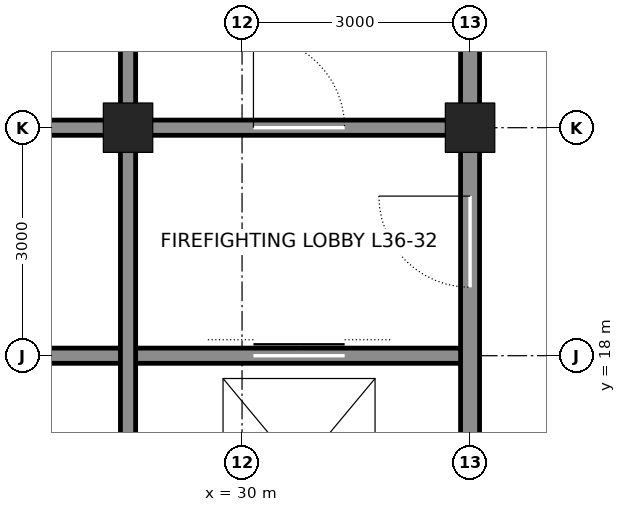
"""IFC4 building model, lengths in metres.
Left out: names, types, materials, properties, quantities, classifications, styles, units other than length and angle.
Written with IfcOpenShell. Run it as: python <this file> out.ifc"""

import sys

from ifc_helpers import new_model, si_unit, direction, frame, frame_2d, origin, origin_2d, place, context, subcontext, project, spatial, rectangle, hollow_rectangle, extrude, element, fill, save


model = new_model("IFC4")
c1 = context("Model", 3, precision=1e-05, world=origin(), true_north=direction((0.0, 1.0)))
c2 = subcontext(c1, "Body", "Model", "MODEL_VIEW")
j1 = project(units=[si_unit("LENGTHUNIT", "METRE"), si_unit("PLANEANGLEUNIT", "RADIAN")], contexts=[c1])
p1 = place(None, origin())
s1 = spatial("IfcSite", under=j1, at=p1, CompositionType="ELEMENT")
p2 = place(p1, origin())
s2 = spatial("IfcBuilding", under=s1, at=p2, CompositionType="ELEMENT")
p3 = place(p2, frame((0.0, 0.0, 165.6)))
s3 = spatial("IfcBuildingStorey", under=s2, at=p3, CompositionType="ELEMENT", Elevation=165.6)
for number, where, z_axis, x_axis in (
    (1, (33.0, 21.0, 0.0), (0.0, 0.0, 1.0), (1.0, 0.0, 0.0)),
    (2, (28.5, 21.0, 0.0), (0.0, 0.0, 1.0), (1.0, 0.0, 0.0)),
):
    element("IfcColumn", number, at=place(p3, frame(where, z_axis=z_axis, x_axis=x_axis)), inside=s3, PredefinedType="COLUMN", context=c2, shape_type="SweptSolid", body=[
        extrude(hollow_rectangle(XDim=0.65, YDim=0.65, WallThickness=0.065, at=origin_2d()), origin(), (0.0, 0.0, 1.0), 4.2),
    ])
p4 = place(p3, frame((25.5, 18.0, 0.0), z_axis=(0.0, 0.0, 1.0), x_axis=(1.0, 0.0, 0.0)))
e3 = element("IfcWall", 3, at=p4, inside=s3, PredefinedType="SOLIDWALL", context=c2, shape_type="SweptSolid", body=[
    extrude(rectangle(XDim=7.5, YDim=0.2, at=frame_2d((3.75, 0.0))), origin(), (0.0, 0.0, 1.0), 4.04),
])
p5 = place(p4, frame((4.65, 0.0, 0.0)))
e4 = element("IfcOpeningElement", 4, at=p5, cuts=e3, PredefinedType="OPENING", context=c2, shape_type="SweptSolid", body=[
    extrude(rectangle(XDim=1.2, YDim=2.1, at=frame_2d((0.6, 1.05))), frame((0.0, 0.11, 0.0), z_axis=(0.0, -1.0, 0.0), x_axis=(1.0, 0.0, 0.0)), (0.0, 0.0, 1.0), 0.22),
])
p6 = place(p3, frame((25.5, 21.0, 0.0), z_axis=(0.0, 0.0, 1.0), x_axis=(1.0, 0.0, 0.0)))
e5 = element("IfcWall", 5, at=p6, inside=s3, PredefinedType="SOLIDWALL", context=c2, shape_type="SweptSolid", body=[
    extrude(rectangle(XDim=2.75, YDim=0.2, at=frame_2d((1.375, 0.0))), origin(), (0.0, 0.0, 1.0), 3.09),
])
p7 = place(p3, frame((28.75, 21.0, 0.0), z_axis=(0.0, 0.0, 1.0), x_axis=(1.0, 0.0, 0.0)))
e6 = element("IfcWall", 6, at=p7, inside=s3, PredefinedType="SOLIDWALL", context=c2, shape_type="SweptSolid", body=[
    extrude(rectangle(XDim=4.0, YDim=0.2, at=frame_2d((2.0, 0.0))), origin(), (0.0, 0.0, 1.0), 3.09),
])
p8 = place(p7, frame((1.4, 0.0, 0.0)))
e7 = element("IfcOpeningElement", 7, at=p8, cuts=e6, PredefinedType="OPENING", context=c2, shape_type="SweptSolid", body=[
    extrude(rectangle(XDim=1.2, YDim=2.1, at=frame_2d((0.6, 1.05))), frame((0.0, 0.11, 0.0), z_axis=(0.0, -1.0, 0.0), x_axis=(1.0, 0.0, 0.0)), (0.0, 0.0, 1.0), 0.22),
])
p9 = place(p3, frame((28.5, 12.25, 0.0), z_axis=(0.0, 0.0, 1.0), x_axis=(0.0, 1.0, 0.0)))
e8 = element("IfcWall", 8, at=p9, inside=s3, PredefinedType="SOLIDWALL", context=c2, shape_type="SweptSolid", body=[
    extrude(rectangle(XDim=8.5, YDim=0.2, at=frame_2d((4.25, 0.0))), origin(), (0.0, 0.0, 1.0), 3.113),
])
p10 = place(p3, frame((28.5, 21.25, 0.0), z_axis=(0.0, 0.0, 1.0), x_axis=(0.0, 1.0, 0.0)))
e9 = element("IfcWall", 9, at=p10, inside=s3, PredefinedType="SOLIDWALL", context=c2, shape_type="SweptSolid", body=[
    extrude(rectangle(XDim=2.5, YDim=0.2, at=frame_2d((1.25, 0.0))), origin(), (0.0, 0.0, 1.0), 3.113),
])
p11 = place(p3, frame((33.0, 12.25, 0.0), z_axis=(0.0, 0.0, 1.0), x_axis=(0.0, 1.0, 0.0)))
e10 = element("IfcWall", 10, at=p11, inside=s3, PredefinedType="SOLIDWALL", context=c2, shape_type="SweptSolid", body=[
    extrude(rectangle(XDim=8.5, YDim=0.25, at=frame_2d((4.25, 0.0))), origin(), (0.0, 0.0, 1.0), 3.113),
])
p12 = place(p11, frame((6.65, 0.0, 0.0)))
e11 = element("IfcOpeningElement", 11, at=p12, cuts=e10, PredefinedType="OPENING", context=c2, shape_type="SweptSolid", body=[
    extrude(rectangle(XDim=1.2, YDim=2.1, at=frame_2d((0.6, 1.05))), frame((0.0, 0.135, 0.0), z_axis=(0.0, -1.0, 0.0), x_axis=(1.0, 0.0, 0.0)), (0.0, 0.0, 1.0), 0.27),
])
p13 = place(p11, frame((0.875, 0.0, 0.0)))
e12 = element("IfcOpeningElement", 12, at=p13, cuts=e10, PredefinedType="OPENING", context=c2, shape_type="SweptSolid", body=[
    extrude(rectangle(XDim=0.75, YDim=2.1, at=frame_2d((0.375, 1.05))), frame((0.0, 0.135, 0.0), z_axis=(0.0, -1.0, 0.0), x_axis=(1.0, 0.0, 0.0)), (0.0, 0.0, 1.0), 0.27),
])
p14 = place(p3, frame((33.0, 21.25, 0.0), z_axis=(0.0, 0.0, 1.0), x_axis=(0.0, 1.0, 0.0)))
e13 = element("IfcWall", 13, at=p14, inside=s3, PredefinedType="SOLIDWALL", context=c2, shape_type="SweptSolid", body=[
    extrude(rectangle(XDim=2.5, YDim=0.25, at=frame_2d((1.25, 0.0))), origin(), (0.0, 0.0, 1.0), 3.113),
])
p15 = place(p8, origin())
e14 = element("IfcDoor", 14, at=p15, inside=s3, OperationType="SINGLE_SWING_LEFT", PredefinedType="DOOR", context=c2, shape_type="SweptSolid", body=[
    extrude(rectangle(XDim=1.2, YDim=2.1, at=frame_2d((0.6, 1.05))), frame((0.0, 0.025, 0.0), z_axis=(0.0, -1.0, 0.0), x_axis=(1.0, 0.0, 0.0)), (0.0, 0.0, 1.0), 0.05),
])
fill(e7, e14)
p16 = place(p12, origin())
e15 = element("IfcDoor", 15, at=p16, inside=s3, OperationType="SINGLE_SWING_RIGHT", PredefinedType="DOOR", context=c2, shape_type="SweptSolid", body=[
    extrude(rectangle(XDim=1.2, YDim=2.1, at=frame_2d((0.6, 1.05))), frame((0.0, 0.025, 0.0), z_axis=(0.0, -1.0, 0.0), x_axis=(1.0, 0.0, 0.0)), (0.0, 0.0, 1.0), 0.05),
])
fill(e11, e15)
p17 = place(p5, origin())
e16 = element("IfcDoor", 16, at=p17, inside=s3, OperationType="DOUBLE_DOOR_SLIDING", PredefinedType="DOOR", context=c2, shape_type="SweptSolid", body=[
    extrude(rectangle(XDim=1.2, YDim=2.1, at=frame_2d((0.6, 1.05))), frame((0.0, 0.025, 0.0), z_axis=(0.0, -1.0, 0.0), x_axis=(1.0, 0.0, 0.0)), (0.0, 0.0, 1.0), 0.05),
])
fill(e4, e16)
save(model, sys.argv[1])
